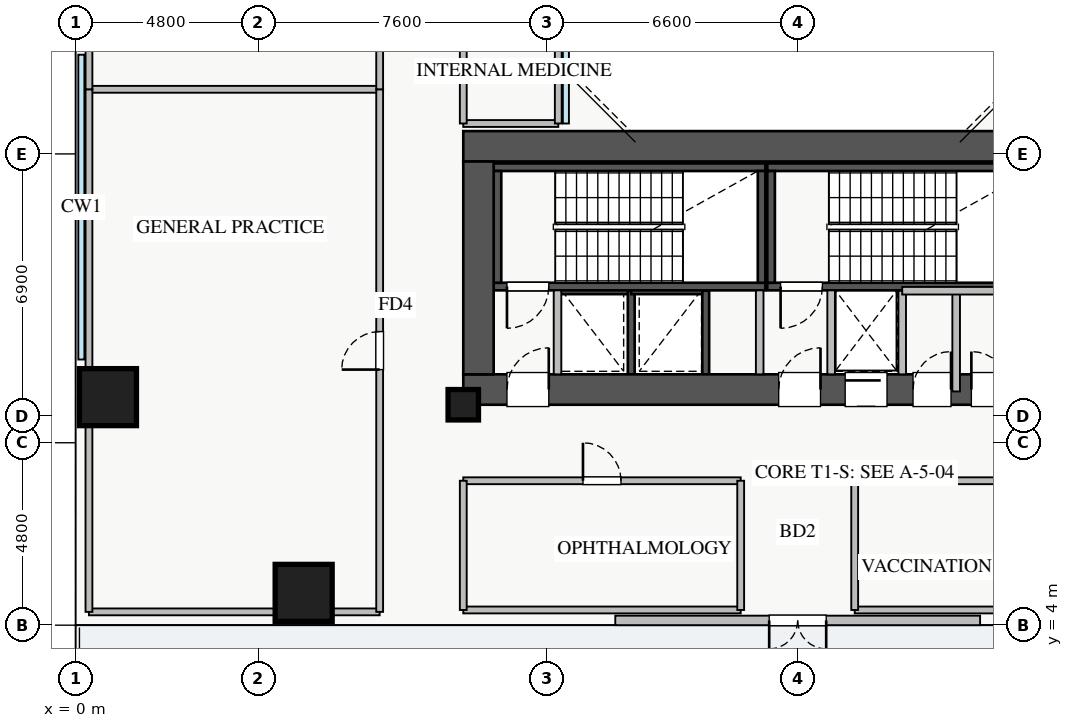
"""IFC4 building model, lengths in metres.
Left out: names, types, materials, properties, quantities, classifications, styles, units other than length and angle.
Written with IfcOpenShell. Run it as: python <this file> out.ifc"""

import sys

from ifc_helpers import new_model, si_unit, direction, frame, frame_2d, origin, origin_2d, place, context, subcontext, project, spatial, rectangle, extrude, source, transform, mapped, element, fill, save


model = new_model("IFC4")
c1 = context("Model", 3, precision=1e-05, world=origin(), true_north=direction((0.0, 1.0)))
c2 = subcontext(c1, "Body", "Model", "MODEL_VIEW")
j1 = project(units=[si_unit("LENGTHUNIT", "METRE"), si_unit("PLANEANGLEUNIT", "RADIAN")], contexts=[c1])
p1 = place(None, origin())
s1 = spatial("IfcSite", under=j1, at=p1, CompositionType="ELEMENT")
p2 = place(p1, origin())
s2 = spatial("IfcBuilding", under=s1, at=p2, CompositionType="ELEMENT")
p3 = place(p2, frame((0.0, 0.0, 9.4)))
s3 = spatial("IfcBuildingStorey", under=s2, at=p3, CompositionType="ELEMENT", Elevation=9.4)
p4 = place(p3, frame((12.68, 12.8, 0.0), z_axis=(0.0, 0.0, 1.0), x_axis=(1.0, 0.0, 0.0)))
e1 = element("IfcWall", 1, at=p4, inside=s3, PredefinedType="SHEAR", context=c2, shape_type="SweptSolid", body=[
    extrude(rectangle(XDim=1.94, YDim=0.18, at=frame_2d((0.97, 0.0))), origin(), (0.0, 0.0, 1.0), 4.18),
])
p5 = place(p3, frame((14.62, 10.6, 0.0), z_axis=(0.0, 0.0, 1.0), x_axis=(0.0, 1.0, 0.0)))
e2 = element("IfcWall", 2, at=p5, inside=s3, PredefinedType="SHEAR", context=c2, shape_type="SweptSolid", body=[
    extrude(rectangle(XDim=2.2, YDim=0.18, at=frame_2d((1.1, 0.0))), origin(), (0.0, 0.0, 1.0), 4.18),
])
p6 = place(p3, frame((14.62, 12.8, 0.0), z_axis=(0.0, 0.0, 1.0), x_axis=(1.0, 0.0, 0.0)))
e3 = element("IfcWall", 3, at=p6, inside=s3, PredefinedType="SHEAR", context=c2, shape_type="SweptSolid", body=[
    extrude(rectangle(XDim=1.96, YDim=0.18, at=frame_2d((0.98, 0.0))), origin(), (0.0, 0.0, 1.0), 4.18),
])
p7 = place(p3, frame((16.58, 10.6, 0.0), z_axis=(0.0, 0.0, 1.0), x_axis=(0.0, 1.0, 0.0)))
e4 = element("IfcWall", 4, at=p7, inside=s3, PredefinedType="SHEAR", context=c2, shape_type="SweptSolid", body=[
    extrude(rectangle(XDim=2.2, YDim=0.18, at=frame_2d((1.1, 0.0))), origin(), (0.0, 0.0, 1.0), 4.18),
])
p8 = place(p3, frame((19.88, 12.8, 0.0), z_axis=(0.0, 0.0, 1.0), x_axis=(1.0, 0.0, 0.0)))
e5 = element("IfcWall", 5, at=p8, inside=s3, PredefinedType="SHEAR", context=c2, shape_type="SweptSolid", body=[
    extrude(rectangle(XDim=1.87, YDim=0.18, at=frame_2d((0.935, 0.0))), origin(), (0.0, 0.0, 1.0), 4.18),
])
p9 = place(p3, frame((11.0, 12.91, 0.0), z_axis=(0.0, 0.0, 1.0), x_axis=(1.0, 0.0, 0.0)))
e6 = element("IfcWall", 6, at=p9, inside=s3, PredefinedType="SHEAR", context=c2, shape_type="SweptSolid", body=[
    extrude(rectangle(XDim=7.15, YDim=0.2, at=frame_2d((3.575, 0.0))), origin(), (0.0, 0.0, 1.0), 4.4),
])
p10 = place(p9, frame((0.35, 0.0, 0.0)))
e7 = element("IfcOpeningElement", 7, at=p10, cuts=e6, PredefinedType="OPENING", context=c2, shape_type="SweptSolid", body=[
    extrude(rectangle(XDim=1.1, YDim=2.05, at=frame_2d((0.55, 1.025))), frame((0.0, 0.11, 0.0), z_axis=(0.0, -1.0, 0.0), x_axis=(1.0, 0.0, 0.0)), (0.0, 0.0, 1.0), 0.22),
])
p11 = place(p3, frame((11.0, 16.05, 0.0), z_axis=(0.0, 0.0, 1.0), x_axis=(1.0, 0.0, 0.0)))
e8 = element("IfcWall", 8, at=p11, inside=s3, PredefinedType="SHEAR", context=c2, shape_type="SweptSolid", body=[
    extrude(rectangle(XDim=7.15, YDim=0.2, at=frame_2d((3.575, 0.0))), origin(), (0.0, 0.0, 1.0), 4.4),
])
for number, where, z_axis, x_axis in (
    (9, (11.1, 13.01, 0.0), (0.0, 0.0, 1.0), (0.0, 1.0, 0.0)),
    (10, (18.05, 13.01, 0.0), (0.0, 0.0, 1.0), (0.0, 1.0, 0.0)),
):
    element("IfcWall", number, at=place(p3, frame(where, z_axis=z_axis, x_axis=x_axis)), inside=s3, PredefinedType="SHEAR", context=c2, shape_type="SweptSolid", body=[
        extrude(rectangle(XDim=2.94, YDim=0.2, at=frame_2d((1.47, 0.0))), origin(), (0.0, 0.0, 1.0), 4.4),
    ])
p12 = place(p3, frame((18.2, 12.91, 0.0), z_axis=(0.0, 0.0, 1.0), x_axis=(1.0, 0.0, 0.0)))
e11 = element("IfcWall", 11, at=p12, inside=s3, PredefinedType="SHEAR", context=c2, shape_type="SweptSolid", body=[
    extrude(rectangle(XDim=7.15, YDim=0.2, at=frame_2d((3.575, 0.0))), origin(), (0.0, 0.0, 1.0), 4.4),
])
p13 = place(p12, frame((0.35, 0.0, 0.0)))
e12 = element("IfcOpeningElement", 12, at=p13, cuts=e11, PredefinedType="OPENING", context=c2, shape_type="SweptSolid", body=[
    extrude(rectangle(XDim=1.1, YDim=2.05, at=frame_2d((0.55, 1.025))), frame((0.0, 0.11, 0.0), z_axis=(0.0, -1.0, 0.0), x_axis=(1.0, 0.0, 0.0)), (0.0, 0.0, 1.0), 0.22),
])
p14 = place(p3, frame((18.2, 16.05, 0.0), z_axis=(0.0, 0.0, 1.0), x_axis=(1.0, 0.0, 0.0)))
e13 = element("IfcWall", 13, at=p14, inside=s3, PredefinedType="SHEAR", context=c2, shape_type="SweptSolid", body=[
    extrude(rectangle(XDim=7.15, YDim=0.2, at=frame_2d((3.575, 0.0))), origin(), (0.0, 0.0, 1.0), 4.4),
])
p15 = place(p3, frame((18.3, 13.01, 0.0), z_axis=(0.0, 0.0, 1.0), x_axis=(0.0, 1.0, 0.0)))
e14 = element("IfcWall", 14, at=p15, inside=s3, PredefinedType="SHEAR", context=c2, shape_type="SweptSolid", body=[
    extrude(rectangle(XDim=2.94, YDim=0.2, at=frame_2d((1.47, 0.0))), origin(), (0.0, 0.0, 1.0), 4.4),
])
p16 = place(p3, frame((10.2, 10.2, 0.0), z_axis=(0.0, 0.0, 1.0), x_axis=(1.0, 0.0, 0.0)))
e15 = element("IfcWall", 15, at=p16, inside=s3, PredefinedType="SHEAR", context=c2, shape_type="SweptSolid", body=[
    extrude(rectangle(XDim=17.6, YDim=0.8, at=frame_2d((8.8, 0.0))), origin(), (0.0, 0.0, 1.0), 4.4),
])
p17 = place(p16, frame((1.15, 0.0, 0.0)))
e16 = element("IfcOpeningElement", 16, at=p17, cuts=e15, PredefinedType="OPENING", context=c2, shape_type="SweptSolid", body=[
    extrude(rectangle(XDim=1.1, YDim=2.05, at=frame_2d((0.55, 1.025))), frame((0.0, 0.41, 0.0), z_axis=(0.0, -1.0, 0.0), x_axis=(1.0, 0.0, 0.0)), (0.0, 0.0, 1.0), 0.82),
])
p18 = place(p16, frame((8.3, 0.0, 0.0)))
e17 = element("IfcOpeningElement", 17, at=p18, cuts=e15, PredefinedType="OPENING", context=c2, shape_type="SweptSolid", body=[
    extrude(rectangle(XDim=1.1, YDim=2.05, at=frame_2d((0.55, 1.025))), frame((0.0, 0.41, 0.0), z_axis=(0.0, -1.0, 0.0), x_axis=(1.0, 0.0, 0.0)), (0.0, 0.0, 1.0), 0.82),
])
p19 = place(p16, frame((10.05, 0.0, 0.0)))
e18 = element("IfcOpeningElement", 18, at=p19, cuts=e15, PredefinedType="OPENING", context=c2, shape_type="SweptSolid", body=[
    extrude(rectangle(XDim=1.1, YDim=2.05, at=frame_2d((0.55, 1.025))), frame((0.0, 0.41, 0.0), z_axis=(0.0, -1.0, 0.0), x_axis=(1.0, 0.0, 0.0)), (0.0, 0.0, 1.0), 0.82),
])
p20 = place(p16, frame((14.74, 0.0, 0.0)))
e19 = element("IfcOpeningElement", 19, at=p20, cuts=e15, PredefinedType="OPENING", context=c2, shape_type="SweptSolid", body=[
    extrude(rectangle(XDim=1.0, YDim=2.05, at=frame_2d((0.5, 1.025))), frame((0.0, 0.41, 0.0), z_axis=(0.0, -1.0, 0.0), x_axis=(1.0, 0.0, 0.0)), (0.0, 0.0, 1.0), 0.82),
])
p21 = place(p16, frame((11.835, 0.0, 0.0)))
e20 = element("IfcOpeningElement", 20, at=p21, cuts=e15, PredefinedType="OPENING", context=c2, shape_type="SweptSolid", body=[
    extrude(rectangle(XDim=1.0, YDim=2.05, at=frame_2d((0.5, 1.025))), frame((0.0, 0.41, 0.0), z_axis=(0.0, -1.0, 0.0), x_axis=(1.0, 0.0, 0.0)), (0.0, 0.0, 1.0), 0.82),
])
p22 = place(p16, frame((13.37, 0.0, 0.0)))
e21 = element("IfcOpeningElement", 21, at=p22, cuts=e15, PredefinedType="OPENING", context=c2, shape_type="SweptSolid", body=[
    extrude(rectangle(XDim=1.0, YDim=2.05, at=frame_2d((0.5, 1.025))), frame((0.0, 0.41, 0.0), z_axis=(0.0, -1.0, 0.0), x_axis=(1.0, 0.0, 0.0)), (0.0, 0.0, 1.0), 0.82),
])
p23 = place(p3, frame((10.2, 16.6, 0.0), z_axis=(0.0, 0.0, 1.0), x_axis=(1.0, 0.0, 0.0)))
e22 = element("IfcWall", 22, at=p23, inside=s3, PredefinedType="SHEAR", context=c2, shape_type="SweptSolid", body=[
    extrude(rectangle(XDim=17.6, YDim=0.8, at=frame_2d((8.8, 0.0))), origin(), (0.0, 0.0, 1.0), 4.4),
])
p24 = place(p3, frame((10.6, 10.6, 0.0), z_axis=(0.0, 0.0, 1.0), x_axis=(0.0, 1.0, 0.0)))
e23 = element("IfcWall", 23, at=p24, inside=s3, PredefinedType="SHEAR", context=c2, shape_type="SweptSolid", body=[
    extrude(rectangle(XDim=5.6, YDim=0.8, at=frame_2d((2.8, 0.0))), origin(), (0.0, 0.0, 1.0), 4.4),
])
m1 = source(origin(), c2, "Body", "SweptSolid", [
    extrude(rectangle(XDim=1.5, YDim=1.5, at=origin_2d()), origin(), (0.0, 0.0, 1.0), 4.4),
])
for number, where, z_axis, x_axis in (
    (24, (6.0, 4.85, 0.0), (0.0, 0.0, 1.0), (1.0, 0.0, 0.0)),
    (25, (0.85, 10.0, 0.0), (0.0, 0.0, 1.0), (1.0, 0.0, 0.0)),
):
    element("IfcColumn", number, at=place(p3, frame(where, z_axis=z_axis, x_axis=x_axis)), inside=s3, PredefinedType="COLUMN", context=c2, shape_type="MappedRepresentation", body=[
        mapped(m1, transform((0.0, 0.0, 0.0), x_axis=(1.0, 0.0, 0.0), y_axis=(0.0, 1.0, 0.0), z_axis=(0.0, 0.0, 1.0), scale=1.0)),
    ])
m2 = source(origin(), c2, "Body", "SweptSolid", [
    extrude(rectangle(XDim=0.8, YDim=0.8, at=origin_2d()), origin(), (0.0, 0.0, 1.0), 4.4),
])
p25 = place(p3, frame((10.2, 9.8, 0.0), z_axis=(0.0, 0.0, 1.0), x_axis=(1.0, 0.0, 0.0)))
e26 = element("IfcColumn", 26, at=p25, inside=s3, PredefinedType="PILASTER", context=c2, shape_type="MappedRepresentation", body=[
    mapped(m2, transform((0.0, 0.0, 0.0), x_axis=(1.0, 0.0, 0.0), y_axis=(0.0, 1.0, 0.0), z_axis=(0.0, 0.0, 1.0), scale=1.0)),
])
p26 = place(p3, frame((14.2, 4.125, 0.0), z_axis=(0.0, 0.0, 1.0), x_axis=(1.0, 0.0, 0.0)))
e27 = element("IfcWall", 27, at=p26, inside=s3, PredefinedType="STANDARD", context=c2, shape_type="SweptSolid", body=[
    extrude(rectangle(XDim=9.6, YDim=0.25, at=frame_2d((4.8, 0.0))), origin(), (0.0, 0.0, 1.0), 3.72),
])
p27 = place(p26, frame((4.05, 0.0, 0.0)))
e28 = element("IfcOpeningElement", 28, at=p27, cuts=e27, PredefinedType="OPENING", context=c2, shape_type="SweptSolid", body=[
    extrude(rectangle(XDim=1.5, YDim=2.15, at=frame_2d((0.75, 1.075))), frame((0.0, 0.135, 0.0), z_axis=(0.0, -1.0, 0.0), x_axis=(1.0, 0.0, 0.0)), (0.0, 0.0, 1.0), 0.27),
])
for number, where, z_axis, x_axis in (
    (29, (12.68, 10.6, 0.0), (0.0, 0.0, 1.0), (0.0, 1.0, 0.0)),
    (30, (18.0, 10.6, 0.0), (0.0, 0.0, 1.0), (0.0, 1.0, 0.0)),
    (31, (19.88, 10.6, 0.0), (0.0, 0.0, 1.0), (0.0, 1.0, 0.0)),
):
    element("IfcWall", number, at=place(p3, frame(where, z_axis=z_axis, x_axis=x_axis)), inside=s3, PredefinedType="PARTITIONING", context=c2, shape_type="SweptSolid", body=[
        extrude(rectangle(XDim=2.21, YDim=0.2, at=frame_2d((1.105, 0.0))), origin(), (0.0, 0.0, 1.0), 4.18),
    ])
p28 = place(p3, frame((21.75, 10.6, 0.0), z_axis=(0.0, 0.0, 1.0), x_axis=(0.0, 1.0, 0.0)))
e32 = element("IfcWall", 32, at=p28, inside=s3, PredefinedType="PARTITIONING", context=c2, shape_type="SweptSolid", body=[
    extrude(rectangle(XDim=2.2, YDim=0.2, at=frame_2d((1.1, 0.0))), origin(), (0.0, 0.0, 1.0), 4.18),
])
p29 = place(p3, frame((23.17, 10.15, 0.0), z_axis=(0.0, 0.0, 1.0), x_axis=(0.0, 1.0, 0.0)))
e33 = element("IfcWall", 33, at=p29, inside=s3, PredefinedType="PARTITIONING", context=c2, shape_type="SweptSolid", body=[
    extrude(rectangle(XDim=2.65, YDim=0.2, at=frame_2d((1.325, 0.0))), origin(), (0.0, 0.0, 1.0), 4.18),
])
p30 = place(p3, frame((21.75, 12.8, 0.0), z_axis=(0.0, 0.0, 1.0), x_axis=(1.0, 0.0, 0.0)))
e34 = element("IfcWall", 34, at=p30, inside=s3, PredefinedType="PARTITIONING", context=c2, shape_type="SweptSolid", body=[
    extrude(rectangle(XDim=5.17, YDim=0.2, at=frame_2d((2.585, 0.0))), origin(), (0.0, 0.0, 1.0), 4.18),
])
for number, where, z_axis, x_axis in (
    (35, (0.35, 4.35, 0.0), (0.0, 0.0, 1.0), (1.0, 0.0, 0.0)),
    (36, (0.35, 18.1, 0.0), (0.0, 0.0, 1.0), (1.0, 0.0, 0.0)),
):
    element("IfcWall", number, at=place(p3, frame(where, z_axis=z_axis, x_axis=x_axis)), inside=s3, PredefinedType="PARTITIONING", context=c2, shape_type="SweptSolid", body=[
        extrude(rectangle(XDim=7.65, YDim=0.18, at=frame_2d((3.825, 0.0))), origin(), (0.0, 0.0, 1.0), 4.18),
    ])
p31 = place(p3, frame((0.35, 4.35, 0.0), z_axis=(0.0, 0.0, 1.0), x_axis=(0.0, 1.0, 0.0)))
e37 = element("IfcWall", 37, at=p31, inside=s3, PredefinedType="PARTITIONING", context=c2, shape_type="SweptSolid", body=[
    extrude(rectangle(XDim=13.75, YDim=0.18, at=frame_2d((6.875, 0.0))), origin(), (0.0, 0.0, 1.0), 4.18),
])
p32 = place(p3, frame((8.0, 4.35, 0.0), z_axis=(0.0, 0.0, 1.0), x_axis=(0.0, 1.0, 0.0)))
e38 = element("IfcWall", 38, at=p32, inside=s3, PredefinedType="PARTITIONING", context=c2, shape_type="SweptSolid", body=[
    extrude(rectangle(XDim=13.75, YDim=0.18, at=frame_2d((6.875, 0.0))), origin(), (0.0, 0.0, 1.0), 4.18),
])
p33 = place(p32, frame((6.375, 0.0, 0.0)))
e39 = element("IfcOpeningElement", 39, at=p33, cuts=e38, PredefinedType="OPENING", context=c2, shape_type="SweptSolid", body=[
    extrude(rectangle(XDim=1.0, YDim=2.05, at=frame_2d((0.5, 1.025))), frame((0.0, 0.1, 0.0), z_axis=(0.0, -1.0, 0.0), x_axis=(1.0, 0.0, 0.0)), (0.0, 0.0, 1.0), 0.2),
])
p34 = place(p3, frame((0.35, 18.1, 0.0), z_axis=(0.0, 0.0, 1.0), x_axis=(0.0, 1.0, 0.0)))
e40 = element("IfcWall", 40, at=p34, inside=s3, PredefinedType="PARTITIONING", context=c2, shape_type="SweptSolid", body=[
    extrude(rectangle(XDim=12.2, YDim=0.18, at=frame_2d((6.1, 0.0))), origin(), (0.0, 0.0, 1.0), 4.18),
])
p35 = place(p3, frame((8.0, 18.1, 0.0), z_axis=(0.0, 0.0, 1.0), x_axis=(0.0, 1.0, 0.0)))
e41 = element("IfcWall", 41, at=p35, inside=s3, PredefinedType="PARTITIONING", context=c2, shape_type="SweptSolid", body=[
    extrude(rectangle(XDim=12.2, YDim=0.18, at=frame_2d((6.1, 0.0))), origin(), (0.0, 0.0, 1.0), 4.18),
])
p36 = place(p35, frame((5.6, 0.0, 0.0)))
e42 = element("IfcOpeningElement", 42, at=p36, cuts=e41, PredefinedType="OPENING", context=c2, shape_type="SweptSolid", body=[
    extrude(rectangle(XDim=1.0, YDim=2.05, at=frame_2d((0.5, 1.025))), frame((0.0, 0.1, 0.0), z_axis=(0.0, -1.0, 0.0), x_axis=(1.0, 0.0, 0.0)), (0.0, 0.0, 1.0), 0.2),
])
p37 = place(p3, frame((10.2, 17.2, 0.0), z_axis=(0.0, 0.0, 1.0), x_axis=(1.0, 0.0, 0.0)))
e43 = element("IfcWall", 43, at=p37, inside=s3, PredefinedType="PARTITIONING", context=c2, shape_type="SweptSolid", body=[
    extrude(rectangle(XDim=2.5, YDim=0.18, at=frame_2d((1.25, 0.0))), origin(), (0.0, 0.0, 1.0), 4.18),
])
p38 = place(p3, frame((10.2, 17.2, 0.0), z_axis=(0.0, 0.0, 1.0), x_axis=(0.0, 1.0, 0.0)))
e44 = element("IfcWall", 44, at=p38, inside=s3, PredefinedType="PARTITIONING", context=c2, shape_type="SweptSolid", body=[
    extrude(rectangle(XDim=11.6, YDim=0.18, at=frame_2d((5.8, 0.0))), origin(), (0.0, 0.0, 1.0), 4.18),
])
p39 = place(p38, frame((5.3, 0.0, 0.0)))
e45 = element("IfcOpeningElement", 45, at=p39, cuts=e44, PredefinedType="OPENING", context=c2, shape_type="SweptSolid", body=[
    extrude(rectangle(XDim=1.0, YDim=2.05, at=frame_2d((0.5, 1.025))), frame((0.0, 0.1, 0.0), z_axis=(0.0, -1.0, 0.0), x_axis=(1.0, 0.0, 0.0)), (0.0, 0.0, 1.0), 0.2),
])
p40 = place(p3, frame((12.7, 17.2, 0.0), z_axis=(0.0, 0.0, 1.0), x_axis=(0.0, 1.0, 0.0)))
e46 = element("IfcWall", 46, at=p40, inside=s3, PredefinedType="PARTITIONING", context=c2, shape_type="SweptSolid", body=[
    extrude(rectangle(XDim=11.6, YDim=0.18, at=frame_2d((5.8, 0.0))), origin(), (0.0, 0.0, 1.0), 4.18),
])
p41 = place(p3, frame((10.2, 4.4, 0.0), z_axis=(0.0, 0.0, 1.0), x_axis=(1.0, 0.0, 0.0)))
e47 = element("IfcWall", 47, at=p41, inside=s3, PredefinedType="PARTITIONING", context=c2, shape_type="SweptSolid", body=[
    extrude(rectangle(XDim=7.3, YDim=0.18, at=frame_2d((3.65, 0.0))), origin(), (0.0, 0.0, 1.0), 4.18),
])
p42 = place(p3, frame((10.2, 7.8, 0.0), z_axis=(0.0, 0.0, 1.0), x_axis=(1.0, 0.0, 0.0)))
e48 = element("IfcWall", 48, at=p42, inside=s3, PredefinedType="PARTITIONING", context=c2, shape_type="SweptSolid", body=[
    extrude(rectangle(XDim=7.3, YDim=0.18, at=frame_2d((3.65, 0.0))), origin(), (0.0, 0.0, 1.0), 4.18),
])
p43 = place(p42, frame((3.15, 0.0, 0.0)))
e49 = element("IfcOpeningElement", 49, at=p43, cuts=e48, PredefinedType="OPENING", context=c2, shape_type="SweptSolid", body=[
    extrude(rectangle(XDim=1.0, YDim=2.05, at=frame_2d((0.5, 1.025))), frame((0.0, 0.1, 0.0), z_axis=(0.0, -1.0, 0.0), x_axis=(1.0, 0.0, 0.0)), (0.0, 0.0, 1.0), 0.2),
])
for number, where, z_axis, x_axis in (
    (50, (10.2, 4.4, 0.0), (0.0, 0.0, 1.0), (0.0, 1.0, 0.0)),
    (51, (17.5, 4.4, 0.0), (0.0, 0.0, 1.0), (0.0, 1.0, 0.0)),
):
    element("IfcWall", number, at=place(p3, frame(where, z_axis=z_axis, x_axis=x_axis)), inside=s3, PredefinedType="PARTITIONING", context=c2, shape_type="SweptSolid", body=[
        extrude(rectangle(XDim=3.4, YDim=0.18, at=frame_2d((1.7, 0.0))), origin(), (0.0, 0.0, 1.0), 4.18),
    ])
p44 = place(p3, frame((20.5, 4.4, 0.0), z_axis=(0.0, 0.0, 1.0), x_axis=(1.0, 0.0, 0.0)))
e52 = element("IfcWall", 52, at=p44, inside=s3, PredefinedType="PARTITIONING", context=c2, shape_type="SweptSolid", body=[
    extrude(rectangle(XDim=10.4, YDim=0.18, at=frame_2d((5.2, 0.0))), origin(), (0.0, 0.0, 1.0), 4.18),
])
p45 = place(p3, frame((20.5, 7.8, 0.0), z_axis=(0.0, 0.0, 1.0), x_axis=(1.0, 0.0, 0.0)))
e53 = element("IfcWall", 53, at=p45, inside=s3, PredefinedType="PARTITIONING", context=c2, shape_type="SweptSolid", body=[
    extrude(rectangle(XDim=10.4, YDim=0.18, at=frame_2d((5.2, 0.0))), origin(), (0.0, 0.0, 1.0), 4.18),
])
p46 = place(p45, frame((4.7, 0.0, 0.0)))
e54 = element("IfcOpeningElement", 54, at=p46, cuts=e53, PredefinedType="OPENING", context=c2, shape_type="SweptSolid", body=[
    extrude(rectangle(XDim=1.0, YDim=2.05, at=frame_2d((0.5, 1.025))), frame((0.0, 0.1, 0.0), z_axis=(0.0, -1.0, 0.0), x_axis=(1.0, 0.0, 0.0)), (0.0, 0.0, 1.0), 0.2),
])
p47 = place(p3, frame((20.5, 4.4, 0.0), z_axis=(0.0, 0.0, 1.0), x_axis=(0.0, 1.0, 0.0)))
e55 = element("IfcWall", 55, at=p47, inside=s3, PredefinedType="PARTITIONING", context=c2, shape_type="SweptSolid", body=[
    extrude(rectangle(XDim=3.4, YDim=0.18, at=frame_2d((1.7, 0.0))), origin(), (0.0, 0.0, 1.0), 4.18),
])
m3 = source(origin(), c2, "Body", "SweptSolid", [
    extrude(rectangle(XDim=1.5, YDim=2.15, at=frame_2d((0.75, 1.075))), frame((0.0, 0.025, 0.0), z_axis=(0.0, -1.0, 0.0), x_axis=(1.0, 0.0, 0.0)), (0.0, 0.0, 1.0), 0.05),
])
p48 = place(p27, frame((1.5, 0.0, 0.0), z_axis=(0.0, 0.0, 1.0), x_axis=(-1.0, 0.0, 0.0)))
e56 = element("IfcDoor", 56, at=p48, inside=s3, OperationType="DOUBLE_DOOR_SINGLE_SWING", PredefinedType="DOOR", context=c2, shape_type="MappedRepresentation", body=[
    mapped(m3, transform((0.0, 0.0, 0.0), x_axis=(1.0, 0.0, 0.0), y_axis=(0.0, 1.0, 0.0), z_axis=(0.0, 0.0, 1.0), scale=1.0)),
])
fill(e28, e56)
m4 = source(origin(), c2, "Body", "SweptSolid", [
    extrude(rectangle(XDim=1.1, YDim=2.05, at=frame_2d((0.55, 1.025))), frame((0.0, 0.025, 0.0), z_axis=(0.0, -1.0, 0.0), x_axis=(1.0, 0.0, 0.0)), (0.0, 0.0, 1.0), 0.05),
])
p49 = place(p17, origin())
e57 = element("IfcDoor", 57, at=p49, inside=s3, OperationType="SINGLE_SWING_RIGHT", PredefinedType="DOOR", context=c2, shape_type="MappedRepresentation", body=[
    mapped(m4, transform((0.0, 0.0, 0.0), x_axis=(1.0, 0.0, 0.0), y_axis=(0.0, 1.0, 0.0), z_axis=(0.0, 0.0, 1.0), scale=1.0)),
])
fill(e16, e57)
p50 = place(p10, frame((1.1, 0.0, 0.0), z_axis=(0.0, 0.0, 1.0), x_axis=(-1.0, 0.0, 0.0)))
e58 = element("IfcDoor", 58, at=p50, inside=s3, OperationType="SINGLE_SWING_LEFT", PredefinedType="DOOR", context=c2, shape_type="MappedRepresentation", body=[
    mapped(m4, transform((0.0, 0.0, 0.0), x_axis=(1.0, 0.0, 0.0), y_axis=(0.0, 1.0, 0.0), z_axis=(0.0, 0.0, 1.0), scale=1.0)),
])
fill(e7, e58)
p51 = place(p18, origin())
e59 = element("IfcDoor", 59, at=p51, inside=s3, OperationType="SINGLE_SWING_RIGHT", PredefinedType="DOOR", context=c2, shape_type="MappedRepresentation", body=[
    mapped(m4, transform((0.0, 0.0, 0.0), x_axis=(1.0, 0.0, 0.0), y_axis=(0.0, 1.0, 0.0), z_axis=(0.0, 0.0, 1.0), scale=1.0)),
])
fill(e17, e59)
p52 = place(p13, frame((1.1, 0.0, 0.0), z_axis=(0.0, 0.0, 1.0), x_axis=(-1.0, 0.0, 0.0)))
e60 = element("IfcDoor", 60, at=p52, inside=s3, OperationType="SINGLE_SWING_LEFT", PredefinedType="DOOR", context=c2, shape_type="MappedRepresentation", body=[
    mapped(m4, transform((0.0, 0.0, 0.0), x_axis=(1.0, 0.0, 0.0), y_axis=(0.0, 1.0, 0.0), z_axis=(0.0, 0.0, 1.0), scale=1.0)),
])
fill(e12, e60)
p53 = place(p19, origin())
e61 = element("IfcDoor", 61, at=p53, inside=s3, OperationType="SLIDING_TO_RIGHT", PredefinedType="DOOR", context=c2, shape_type="MappedRepresentation", body=[
    mapped(m4, transform((0.0, 0.0, 0.0), x_axis=(1.0, 0.0, 0.0), y_axis=(0.0, 1.0, 0.0), z_axis=(0.0, 0.0, 1.0), scale=1.0)),
])
fill(e18, e61)
m5 = source(origin(), c2, "Body", "SweptSolid", [
    extrude(rectangle(XDim=1.0, YDim=2.05, at=frame_2d((0.5, 1.025))), frame((0.0, 0.025, 0.0), z_axis=(0.0, -1.0, 0.0), x_axis=(1.0, 0.0, 0.0)), (0.0, 0.0, 1.0), 0.05),
])
p54 = place(p21, origin())
e62 = element("IfcDoor", 62, at=p54, inside=s3, OperationType="SINGLE_SWING_RIGHT", PredefinedType="DOOR", context=c2, shape_type="MappedRepresentation", body=[
    mapped(m5, transform((0.0, 0.0, 0.0), x_axis=(1.0, 0.0, 0.0), y_axis=(0.0, 1.0, 0.0), z_axis=(0.0, 0.0, 1.0), scale=1.0)),
])
fill(e20, e62)
p55 = place(p22, origin())
e63 = element("IfcDoor", 63, at=p55, inside=s3, OperationType="SINGLE_SWING_LEFT", PredefinedType="DOOR", context=c2, shape_type="MappedRepresentation", body=[
    mapped(m5, transform((0.0, 0.0, 0.0), x_axis=(1.0, 0.0, 0.0), y_axis=(0.0, 1.0, 0.0), z_axis=(0.0, 0.0, 1.0), scale=1.0)),
])
fill(e21, e63)
p56 = place(p33, origin())
e64 = element("IfcDoor", 64, at=p56, inside=s3, OperationType="SINGLE_SWING_LEFT", PredefinedType="DOOR", context=c2, shape_type="MappedRepresentation", body=[
    mapped(m5, transform((0.0, 0.0, 0.0), x_axis=(1.0, 0.0, 0.0), y_axis=(0.0, 1.0, 0.0), z_axis=(0.0, 0.0, 1.0), scale=1.0)),
])
fill(e39, e64)
p57 = place(p43, origin())
e65 = element("IfcDoor", 65, at=p57, inside=s3, OperationType="SINGLE_SWING_LEFT", PredefinedType="DOOR", context=c2, shape_type="MappedRepresentation", body=[
    mapped(m5, transform((0.0, 0.0, 0.0), x_axis=(1.0, 0.0, 0.0), y_axis=(0.0, 1.0, 0.0), z_axis=(0.0, 0.0, 1.0), scale=1.0)),
])
fill(e49, e65)
save(model, sys.argv[1])
